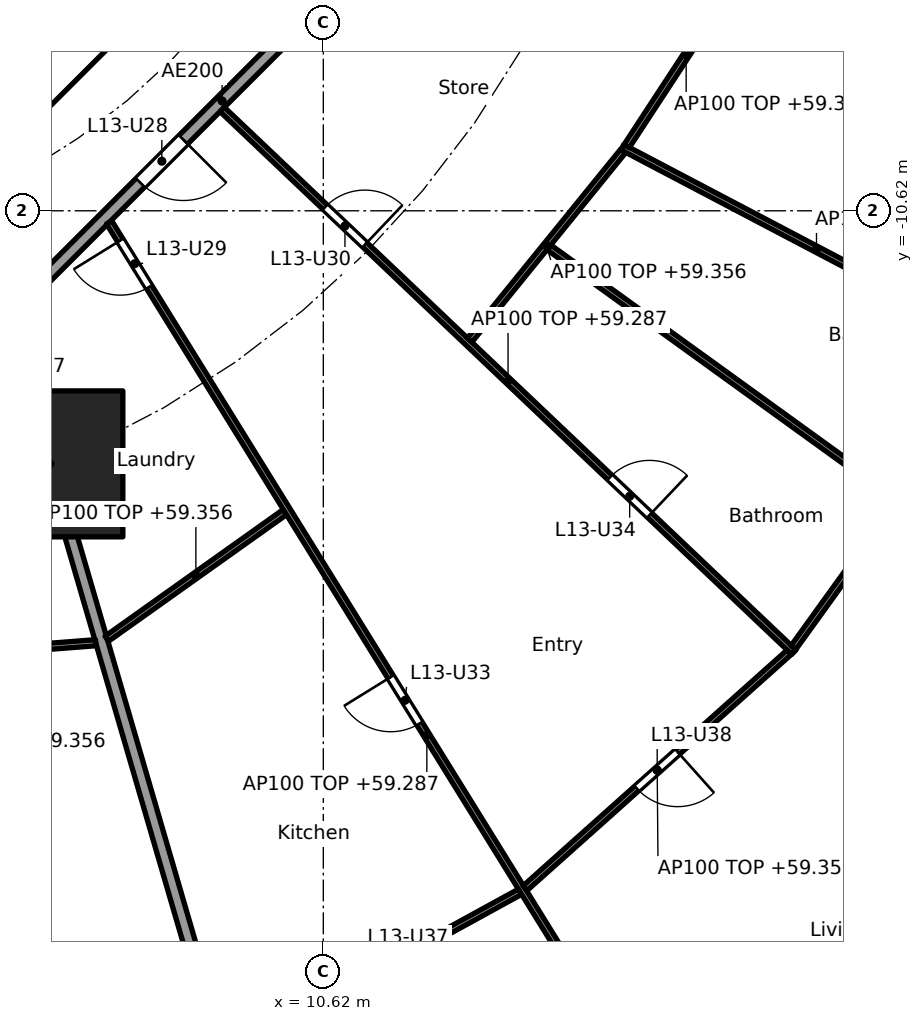
"""IFC4 building model, lengths in metres.
Left out: names, types, materials, properties, quantities, classifications, styles, units other than length and angle.
Written with IfcOpenShell. Run it as: python <this file> out.ifc"""

import sys

from ifc_helpers import new_model, si_unit, direction, frame, frame_2d, origin, origin_2d, place, context, subcontext, project, spatial, rectangle, extrude, element, fill, save


model = new_model("IFC4")
c1 = context("Model", 3, precision=1e-05, world=origin(), true_north=direction((0.0, 1.0)))
c2 = subcontext(c1, "Body", "Model", "MODEL_VIEW")
j1 = project(units=[si_unit("LENGTHUNIT", "METRE"), si_unit("PLANEANGLEUNIT", "RADIAN")], contexts=[c1])
p1 = place(None, origin())
s1 = spatial("IfcSite", under=j1, at=p1, CompositionType="ELEMENT")
p2 = place(p1, origin())
s2 = spatial("IfcBuilding", under=s1, at=p2, CompositionType="ELEMENT")
p3 = place(p2, frame((0.0, 0.0, 56.6)))
s3 = spatial("IfcBuildingStorey", under=s2, at=p3, CompositionType="ELEMENT", Elevation=56.6)
p4 = place(p3, frame((6.123, -14.782, 0.0), z_axis=(0.0, 0.0, 1.0), x_axis=(1.0, 0.0, 0.0)))
e1 = element("IfcColumn", 1, at=p4, inside=s3, PredefinedType="COLUMN", context=c2, shape_type="SweptSolid", body=[
    extrude(rectangle(XDim=2.4, YDim=2.4, at=origin_2d()), origin(), (0.0, 0.0, 1.0), 3.7),
])
p5 = place(p3, frame((4.613, -9.988, 0.0), z_axis=(0.0, 0.0, 1.0), x_axis=(0.707106781187, 0.707106781187, 0.0)))
e2 = element("IfcWall", 2, at=p5, inside=s3, PredefinedType="SHEAR", context=c2, shape_type="SweptSolid", body=[
    extrude(rectangle(XDim=7.602, YDim=0.6, at=frame_2d((3.801, 0.0))), origin(), (0.0, 0.0, 1.0), 3.44),
])
p6 = place(p5, frame((3.201, 0.0, 0.0)))
e3 = element("IfcOpeningElement", 3, at=p6, cuts=e2, PredefinedType="OPENING", context=c2, shape_type="SweptSolid", body=[
    extrude(rectangle(XDim=1.2, YDim=2.1, at=frame_2d((0.6, 1.05))), frame((0.0, 0.31, 0.0), z_axis=(0.0, -1.0, 0.0), x_axis=(1.0, 0.0, 0.0)), (0.0, 0.0, 1.0), 0.62),
])
p7 = place(p3, frame((5.243, -12.657, 0.0), z_axis=(0.0, 0.0, 1.0), x_axis=(0.382707856524, -0.923869415315, 0.0)))
e4 = element("IfcWall", 4, at=p7, inside=s3, PredefinedType="PARTITIONING", context=c2, shape_type="SweptSolid", body=[
    extrude(rectangle(XDim=2.2, YDim=0.2, at=frame_2d((1.1, 0.0))), origin(), (0.0, 0.0, 1.0), 3.44),
])
p8 = place(p3, frame((6.137, -14.83, 0.0), z_axis=(0.0, 0.0, 1.0), x_axis=(0.27985745069, -0.960041565399, 0.0)))
e5 = element("IfcWall", 5, at=p8, inside=s3, PredefinedType="PARTITIONING", context=c2, shape_type="SweptSolid", body=[
    extrude(rectangle(XDim=16.705, YDim=0.2, at=frame_2d((8.353, 0.0))), origin(), (0.0, 0.0, 1.0), 2.756),
])
p9 = place(p3, frame((5.275, -12.494, 0.0), z_axis=(0.0, 0.0, 1.0), x_axis=(0.707106781187, 0.707106781187, 0.0)))
e6 = element("IfcWall", 6, at=p9, inside=s3, PredefinedType="PARTITIONING", context=c2, shape_type="SweptSolid", body=[
    extrude(rectangle(XDim=10.409, YDim=0.2, at=frame_2d((5.205, 0.0))), origin(), (0.0, 0.0, 1.0), 3.44),
])
p10 = place(p9, frame((3.303, 0.0, 0.0)))
e7 = element("IfcOpeningElement", 7, at=p10, cuts=e6, PredefinedType="OPENING", context=c2, shape_type="SweptSolid", body=[
    extrude(rectangle(XDim=1.0, YDim=2.1, at=frame_2d((0.5, 1.05))), frame((0.0, 0.11, 0.0), z_axis=(0.0, -1.0, 0.0), x_axis=(1.0, 0.0, 0.0)), (0.0, 0.0, 1.0), 0.22),
])
p11 = place(p3, frame((2.288, -18.078, 0.0), z_axis=(0.0, 0.0, 1.0), x_axis=(0.99701850123, 0.077162868047, 0.0)))
e8 = element("IfcWall", 8, at=p11, inside=s3, PredefinedType="PARTITIONING", context=c2, shape_type="SweptSolid", body=[
    extrude(rectangle(XDim=4.604, YDim=0.1, at=frame_2d((2.302, 0.0))), origin(), (0.0, 0.0, 1.0), 2.756),
])
p12 = place(p11, frame((1.852, 0.0, 0.0)))
e9 = element("IfcOpeningElement", 9, at=p12, cuts=e8, PredefinedType="OPENING", context=c2, shape_type="SweptSolid", body=[
    extrude(rectangle(XDim=0.9, YDim=2.1, at=frame_2d((0.45, 1.05))), frame((0.0, 0.06, 0.0), z_axis=(0.0, -1.0, 0.0), x_axis=(1.0, 0.0, 0.0)), (0.0, 0.0, 1.0), 0.12),
])
p13 = place(p3, frame((7.06, -17.657, 0.0), z_axis=(0.0, 0.0, 1.0), x_axis=(0.81492039338, 0.57957290521, 0.0)))
e10 = element("IfcWall", 10, at=p13, inside=s3, PredefinedType="PARTITIONING", context=c2, shape_type="SweptSolid", body=[
    extrude(rectangle(XDim=3.594, YDim=0.1, at=frame_2d((1.797, 0.0))), origin(), (0.0, 0.0, 1.0), 2.756),
])
p14 = place(p3, frame((9.045, -24.456, 0.0), z_axis=(0.0, 0.0, 1.0), x_axis=(0.876809987787, 0.480837025734, 0.0)))
e11 = element("IfcWall", 11, at=p14, inside=s3, PredefinedType="PARTITIONING", context=c2, shape_type="SweptSolid", body=[
    extrude(rectangle(XDim=5.486, YDim=0.1, at=frame_2d((2.743, 0.0))), origin(), (0.0, 0.0, 1.0), 2.756),
])
p15 = place(p14, frame((2.293, 0.0, 0.0)))
e12 = element("IfcOpeningElement", 12, at=p15, cuts=e11, PredefinedType="OPENING", context=c2, shape_type="SweptSolid", body=[
    extrude(rectangle(XDim=0.9, YDim=2.1, at=frame_2d((0.45, 1.05))), frame((0.0, 0.06, 0.0), z_axis=(0.0, -1.0, 0.0), x_axis=(1.0, 0.0, 0.0)), (0.0, 0.0, 1.0), 0.12),
])
p16 = place(p3, frame((7.097, -10.81, 0.0), z_axis=(0.0, 0.0, 1.0), x_axis=(0.526453266471, -0.850204068576, 0.0)))
e13 = element("IfcWall", 13, at=p16, inside=s3, PredefinedType="PARTITIONING", context=c2, shape_type="SweptSolid", body=[
    extrude(rectangle(XDim=19.85, YDim=0.1, at=frame_2d((9.925, 0.0))), origin(), (0.0, 0.0, 1.0), 2.687),
])
p17 = place(p16, frame((0.35, 0.0, 0.0)))
e14 = element("IfcOpeningElement", 14, at=p17, cuts=e13, PredefinedType="OPENING", context=c2, shape_type="SweptSolid", body=[
    extrude(rectangle(XDim=0.9, YDim=2.1, at=frame_2d((0.45, 1.05))), frame((0.0, 0.06, 0.0), z_axis=(0.0, -1.0, 0.0), x_axis=(1.0, 0.0, 0.0)), (0.0, 0.0, 1.0), 0.12),
])
p18 = place(p16, frame((8.795, 0.0, 0.0)))
e15 = element("IfcOpeningElement", 15, at=p18, cuts=e13, PredefinedType="OPENING", context=c2, shape_type="SweptSolid", body=[
    extrude(rectangle(XDim=0.9, YDim=2.1, at=frame_2d((0.45, 1.05))), frame((0.0, 0.06, 0.0), z_axis=(0.0, -1.0, 0.0), x_axis=(1.0, 0.0, 0.0)), (0.0, 0.0, 1.0), 0.12),
])
p19 = place(p3, frame((13.936, -21.761, 0.0), z_axis=(0.0, 0.0, 1.0), x_axis=(0.745806142791, 0.666163041136, 0.0)))
e16 = element("IfcWall", 16, at=p19, inside=s3, PredefinedType="PARTITIONING", context=c2, shape_type="SweptSolid", body=[
    extrude(rectangle(XDim=5.831, YDim=0.1, at=frame_2d((2.915, 0.0))), origin(), (0.0, 0.0, 1.0), 2.756),
])
p20 = place(p19, frame((2.465, 0.0, 0.0)))
e17 = element("IfcOpeningElement", 17, at=p20, cuts=e16, PredefinedType="OPENING", context=c2, shape_type="SweptSolid", body=[
    extrude(rectangle(XDim=0.9, YDim=2.1, at=frame_2d((0.45, 1.05))), frame((0.0, 0.06, 0.0), z_axis=(0.0, -1.0, 0.0), x_axis=(1.0, 0.0, 0.0)), (0.0, 0.0, 1.0), 0.12),
])
p21 = place(p3, frame((8.957, -8.953, 0.0), z_axis=(0.0, 0.0, 1.0), x_axis=(0.725250022034, -0.688485588476, 0.0)))
e18 = element("IfcWall", 18, at=p21, inside=s3, PredefinedType="PARTITIONING", context=c2, shape_type="SweptSolid", body=[
    extrude(rectangle(XDim=12.963, YDim=0.1, at=frame_2d((6.481, 0.0))), origin(), (0.0, 0.0, 1.0), 2.687),
])
p22 = place(p21, frame((2.333, 0.0, 0.0)))
e19 = element("IfcOpeningElement", 19, at=p22, cuts=e18, PredefinedType="OPENING", context=c2, shape_type="SweptSolid", body=[
    extrude(rectangle(XDim=0.9, YDim=2.1, at=frame_2d((0.45, 1.05))), frame((0.0, 0.06, 0.0), z_axis=(0.0, -1.0, 0.0), x_axis=(1.0, 0.0, 0.0)), (0.0, 0.0, 1.0), 0.12),
])
p23 = place(p21, frame((8.79, 0.0, 0.0)))
e20 = element("IfcOpeningElement", 20, at=p23, cuts=e18, PredefinedType="OPENING", context=c2, shape_type="SweptSolid", body=[
    extrude(rectangle(XDim=0.9, YDim=2.1, at=frame_2d((0.45, 1.05))), frame((0.0, 0.06, 0.0), z_axis=(0.0, -1.0, 0.0), x_axis=(1.0, 0.0, 0.0)), (0.0, 0.0, 1.0), 0.12),
])
p24 = place(p3, frame((13.026, -12.747, 0.0), z_axis=(0.0, 0.0, 1.0), x_axis=(0.630126826288, 0.776492229705, 0.0)))
e21 = element("IfcWall", 21, at=p24, inside=s3, PredefinedType="PARTITIONING", context=c2, shape_type="SweptSolid", body=[
    extrude(rectangle(XDim=4.007, YDim=0.1, at=frame_2d((2.003, 0.0))), origin(), (0.0, 0.0, 1.0), 2.756),
])
p25 = place(p3, frame((18.351, -17.803, 0.0), z_axis=(0.0, 0.0, 1.0), x_axis=(0.584563700282, 0.811347817099, 0.0)))
e22 = element("IfcWall", 22, at=p25, inside=s3, PredefinedType="PARTITIONING", context=c2, shape_type="SweptSolid", body=[
    extrude(rectangle(XDim=5.984, YDim=0.1, at=frame_2d((2.992, 0.0))), origin(), (0.0, 0.0, 1.0), 2.756),
])
p26 = place(p25, frame((4.038, 0.0, 0.0)))
e23 = element("IfcOpeningElement", 23, at=p26, cuts=e22, PredefinedType="OPENING", context=c2, shape_type="SweptSolid", body=[
    extrude(rectangle(XDim=0.9, YDim=2.1, at=frame_2d((0.45, 1.05))), frame((0.0, 0.06, 0.0), z_axis=(0.0, -1.0, 0.0), x_axis=(1.0, 0.0, 0.0)), (0.0, 0.0, 1.0), 0.12),
])
p27 = place(p3, frame((14.329, -11.221, 0.0), z_axis=(0.0, 0.0, 1.0), x_axis=(0.810671130917, -0.58550176558, 0.0)))
e24 = element("IfcWall", 24, at=p27, inside=s3, PredefinedType="PARTITIONING", context=c2, shape_type="SweptSolid", body=[
    extrude(rectangle(XDim=15.106, YDim=0.1, at=frame_2d((7.553, 0.0))), origin(), (0.0, 0.0, 1.0), 2.837),
])
p28 = place(p27, frame((10.659, 0.0, 0.0)))
e25 = element("IfcOpeningElement", 25, at=p28, cuts=e24, PredefinedType="OPENING", context=c2, shape_type="SweptSolid", body=[
    extrude(rectangle(XDim=0.9, YDim=2.1, at=frame_2d((0.45, 1.05))), frame((0.0, 0.06, 0.0), z_axis=(0.0, -1.0, 0.0), x_axis=(1.0, 0.0, 0.0)), (0.0, 0.0, 1.0), 0.12),
])
p29 = place(p3, frame((15.538, -9.574, 0.0), z_axis=(0.0, 0.0, 1.0), x_axis=(0.88517945493, -0.465249752895, 0.0)))
e26 = element("IfcWall", 26, at=p29, inside=s3, PredefinedType="PARTITIONING", context=c2, shape_type="SweptSolid", body=[
    extrude(rectangle(XDim=7.213, YDim=0.1, at=frame_2d((3.606, 0.0))), origin(), (0.0, 0.0, 1.0), 3.44),
])
p30 = place(p3, frame((15.609, -9.556, 0.0), z_axis=(0.0, 0.0, 1.0), x_axis=(0.547641765292, 0.836712911881, 0.0)))
e27 = element("IfcWall", 27, at=p30, inside=s3, PredefinedType="PARTITIONING", context=c2, shape_type="SweptSolid", body=[
    extrude(rectangle(XDim=3.57, YDim=0.1, at=frame_2d((1.785, 0.0))), origin(), (0.0, 0.0, 1.0), 2.756),
])
p31 = place(p10, frame((1.0, 0.0, 0.0), x_axis=(-1.0, 0.0, 0.0)))
e28 = element("IfcDoor", 28, at=p31, inside=s3, OperationType="SINGLE_SWING_LEFT", PredefinedType="DOOR", context=c2, shape_type="SweptSolid", body=[
    extrude(rectangle(XDim=1.0, YDim=2.1, at=frame_2d((0.5, 1.05))), frame((0.0, 0.025, 0.0), z_axis=(0.0, -1.0, 0.0), x_axis=(1.0, 0.0, 0.0)), (0.0, 0.0, 1.0), 0.05),
])
fill(e7, e28)
p32 = place(p17, frame((0.9, 0.0, 0.0), x_axis=(-1.0, 0.0, 0.0)))
e29 = element("IfcDoor", 29, at=p32, inside=s3, OperationType="SINGLE_SWING_RIGHT", PredefinedType="DOOR", context=c2, shape_type="SweptSolid", body=[
    extrude(rectangle(XDim=0.9, YDim=2.1, at=frame_2d((0.45, 1.05))), frame((0.0, 0.025, 0.0), z_axis=(0.0, -1.0, 0.0), x_axis=(1.0, 0.0, 0.0)), (0.0, 0.0, 1.0), 0.05),
])
fill(e14, e29)
p33 = place(p22, origin())
e30 = element("IfcDoor", 30, at=p33, inside=s3, OperationType="SINGLE_SWING_RIGHT", PredefinedType="DOOR", context=c2, shape_type="SweptSolid", body=[
    extrude(rectangle(XDim=0.9, YDim=2.1, at=frame_2d((0.45, 1.05))), frame((0.0, 0.025, 0.0), z_axis=(0.0, -1.0, 0.0), x_axis=(1.0, 0.0, 0.0)), (0.0, 0.0, 1.0), 0.05),
])
fill(e19, e30)
p34 = place(p18, frame((0.9, 0.0, 0.0), x_axis=(-1.0, 0.0, 0.0)))
e31 = element("IfcDoor", 31, at=p34, inside=s3, OperationType="SINGLE_SWING_RIGHT", PredefinedType="DOOR", context=c2, shape_type="SweptSolid", body=[
    extrude(rectangle(XDim=0.9, YDim=2.1, at=frame_2d((0.45, 1.05))), frame((0.0, 0.025, 0.0), z_axis=(0.0, -1.0, 0.0), x_axis=(1.0, 0.0, 0.0)), (0.0, 0.0, 1.0), 0.05),
])
fill(e15, e31)
p35 = place(p23, origin())
e32 = element("IfcDoor", 32, at=p35, inside=s3, OperationType="SINGLE_SWING_RIGHT", PredefinedType="DOOR", context=c2, shape_type="SweptSolid", body=[
    extrude(rectangle(XDim=0.9, YDim=2.1, at=frame_2d((0.45, 1.05))), frame((0.0, 0.025, 0.0), z_axis=(0.0, -1.0, 0.0), x_axis=(1.0, 0.0, 0.0)), (0.0, 0.0, 1.0), 0.05),
])
fill(e20, e32)
p36 = place(p20, frame((0.9, 0.0, 0.0), x_axis=(-1.0, 0.0, 0.0)))
e33 = element("IfcDoor", 33, at=p36, inside=s3, OperationType="SINGLE_SWING_LEFT", PredefinedType="DOOR", context=c2, shape_type="SweptSolid", body=[
    extrude(rectangle(XDim=0.9, YDim=2.1, at=frame_2d((0.45, 1.05))), frame((0.0, 0.025, 0.0), z_axis=(0.0, -1.0, 0.0), x_axis=(1.0, 0.0, 0.0)), (0.0, 0.0, 1.0), 0.05),
])
fill(e17, e33)
save(model, sys.argv[1])
